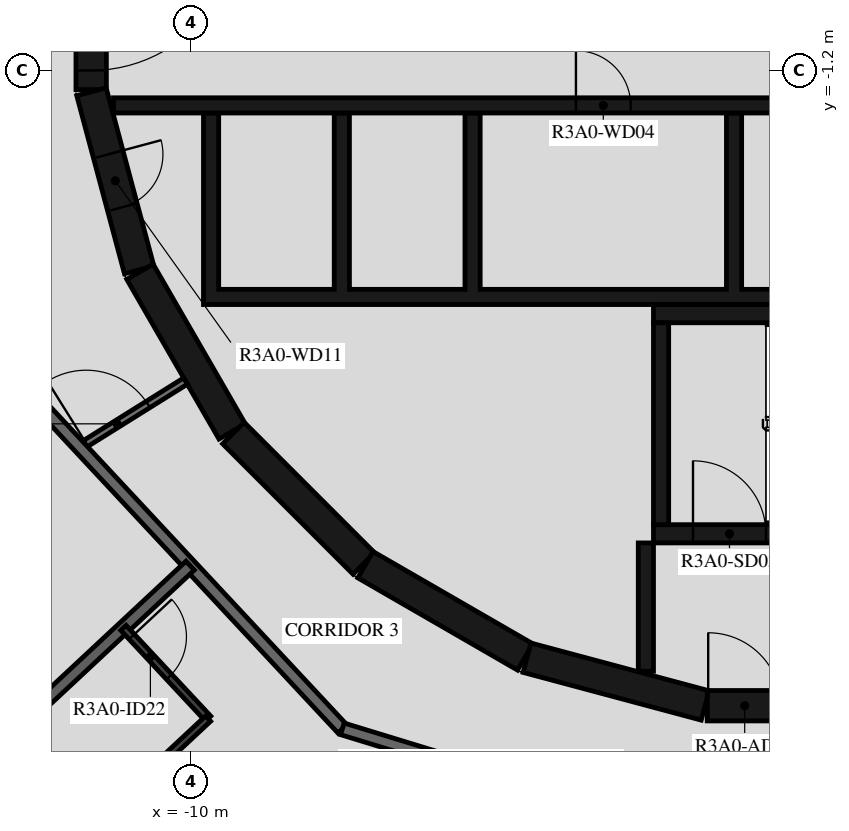
"""IFC4 building model, lengths in metres.
Left out: names, types, materials, properties, quantities, classifications, styles, units other than length and angle.
Written with IfcOpenShell. Run it as: python <this file> out.ifc"""

import sys

from ifc_helpers import new_model, si_unit, direction, frame, frame_2d, origin, place, context, subcontext, project, spatial, polyline, rectangle, outline, extrude, element, fill, save


model = new_model("IFC4")
c1 = context("Model", 3, precision=1e-05, world=origin(), true_north=direction((0.0, 1.0)))
c2 = subcontext(c1, "Body", "Model", "MODEL_VIEW")
j1 = project(units=[si_unit("LENGTHUNIT", "METRE"), si_unit("PLANEANGLEUNIT", "RADIAN")], contexts=[c1])
p1 = place(None, origin())
s1 = spatial("IfcSite", under=j1, at=p1, CompositionType="ELEMENT")
p2 = place(p1, origin())
s2 = spatial("IfcBuilding", under=s1, at=p2, CompositionType="ELEMENT")
p3 = place(p2, frame((0.0, 0.0, 113.4)))
s3 = spatial("IfcBuildingStorey", under=s2, at=p3, CompositionType="ELEMENT", Elevation=113.4)
p4 = place(p3, frame((-11.647, 1.516, 0.0), z_axis=(0.0, 0.0, 1.0), x_axis=(0.0, -1.0, 0.0)))
e1 = element("IfcWall", 1, at=p4, inside=s3, PredefinedType="SHEAR", context=c2, shape_type="SweptSolid", body=[
    extrude(rectangle(XDim=3.033, YDim=0.5, at=frame_2d((1.516, 0.0))), origin(), (0.0, 0.0, 1.0), 3.12),
])
p5 = place(p4, frame((0.316, 0.0, 0.0)))
e2 = element("IfcOpeningElement", 2, at=p5, cuts=e1, PredefinedType="OPENING", context=c2, shape_type="SweptSolid", body=[
    extrude(rectangle(XDim=2.4, YDim=2.1, at=frame_2d((1.2, 1.05))), frame((0.0, 0.26, 0.0), z_axis=(0.0, -1.0, 0.0), x_axis=(1.0, 0.0, 0.0)), (0.0, 0.0, 1.0), 0.52),
])
p6 = place(p3, frame((-11.643, -1.55, 0.0), z_axis=(0.0, 0.0, 1.0), x_axis=(0.258734743916, -0.965948410781, 0.0)))
e3 = element("IfcWall", 3, at=p6, inside=s3, PredefinedType="SHEAR", context=c2, shape_type="SweptSolid", body=[
    extrude(rectangle(XDim=3.033, YDim=0.5, at=frame_2d((1.516, 0.0))), origin(), (0.0, 0.0, 1.0), 3.12),
])
p7 = place(p6, frame((1.066, 0.0, 0.0)))
e4 = element("IfcOpeningElement", 4, at=p7, cuts=e3, PredefinedType="OPENING", context=c2, shape_type="SweptSolid", body=[
    extrude(rectangle(XDim=0.9, YDim=2.1, at=frame_2d((0.45, 1.05))), frame((0.0, 0.26, 0.0), z_axis=(0.0, -1.0, 0.0), x_axis=(1.0, 0.0, 0.0)), (0.0, 0.0, 1.0), 0.52),
])
p8 = place(p3, frame((-10.845, -4.51, 0.0), z_axis=(0.0, 0.0, 1.0), x_axis=(0.500087131594, -0.865975092491, 0.0)))
e5 = element("IfcWall", 5, at=p8, inside=s3, PredefinedType="SHEAR", context=c2, shape_type="SweptSolid", body=[
    extrude(rectangle(XDim=3.033, YDim=0.5, at=frame_2d((1.516, 0.0))), origin(), (0.0, 0.0, 1.0), 3.12),
])
p9 = place(p3, frame((-9.308, -7.164, 0.0), z_axis=(0.0, 0.0, 1.0), x_axis=(0.707106781187, -0.707106781187, 0.0)))
e6 = element("IfcWall", 6, at=p9, inside=s3, PredefinedType="SHEAR", context=c2, shape_type="SweptSolid", body=[
    extrude(rectangle(XDim=3.032, YDim=0.5, at=frame_2d((1.516, 0.0))), origin(), (0.0, 0.0, 1.0), 3.12),
])
for number, where, z_axis, x_axis in (
    (7, (-7.137, -9.329, 0.0), (0.0, 0.0, 1.0), (0.866, -0.5, 0.0)),
    (8, (-4.479, -10.858, 0.0), (0.0, 0.0, 1.0), (0.966, -0.259, 0.0)),
):
    element("IfcWall", number, at=place(p3, frame(where, z_axis=z_axis, x_axis=x_axis)), inside=s3, PredefinedType="SHEAR", context=c2, shape_type="SweptSolid", body=[
        extrude(rectangle(XDim=3.033, YDim=0.5, at=frame_2d((1.516, 0.0))), origin(), (0.0, 0.0, 1.0), 3.12),
    ])
p10 = place(p3, frame((-1.516, -11.647, 0.0), z_axis=(0.0, 0.0, 1.0), x_axis=(1.0, 0.0, 0.0)))
e9 = element("IfcWall", 9, at=p10, inside=s3, PredefinedType="SHEAR", context=c2, shape_type="SweptSolid", body=[
    extrude(rectangle(XDim=3.033, YDim=0.5, at=frame_2d((1.516, 0.0))), origin(), (0.0, 0.0, 1.0), 3.12),
])
p11 = place(p10, frame((0.016, 0.0, 0.0)))
e10 = element("IfcOpeningElement", 10, at=p11, cuts=e9, PredefinedType="OPENING", context=c2, shape_type="SweptSolid", body=[
    extrude(rectangle(XDim=1.2, YDim=2.1, at=frame_2d((0.6, 1.05))), frame((0.0, 0.26, 0.0), z_axis=(0.0, -1.0, 0.0), x_axis=(1.0, 0.0, 0.0)), (0.0, 0.0, 1.0), 0.52),
])
p12 = place(p3, frame((-2.275, -8.67, 0.0), z_axis=(0.0, 0.0, 1.0), x_axis=(0.0, 1.0, 0.0)))
e11 = element("IfcWall", 11, at=p12, inside=s3, PredefinedType="SHEAR", context=c2, shape_type="SweptSolid", body=[
    extrude(rectangle(XDim=3.32, YDim=0.25, at=frame_2d((1.66, 0.0))), origin(), (0.0, 0.0, 1.0), 3.12),
])
p13 = place(p3, frame((-2.4, -5.2, 0.0), z_axis=(0.0, 0.0, 1.0), x_axis=(1.0, 0.0, 0.0)))
e12 = element("IfcWall", 12, at=p13, inside=s3, PredefinedType="SHEAR", context=c2, shape_type="SweptSolid", body=[
    extrude(rectangle(XDim=7.05, YDim=0.3, at=frame_2d((3.525, 0.0))), origin(), (0.0, 0.0, 1.0), 3.12),
])
p14 = place(p3, frame((-2.4, -8.82, 0.0), z_axis=(0.0, 0.0, 1.0), x_axis=(1.0, 0.0, 0.0)))
e13 = element("IfcWall", 13, at=p14, inside=s3, PredefinedType="SHEAR", context=c2, shape_type="SweptSolid", body=[
    extrude(rectangle(XDim=2.5, YDim=0.3, at=frame_2d((1.25, 0.0))), origin(), (0.0, 0.0, 1.0), 3.12),
])
p15 = place(p14, frame((0.65, 0.0, 0.0)))
e14 = element("IfcOpeningElement", 14, at=p15, cuts=e13, PredefinedType="OPENING", context=c2, shape_type="SweptSolid", body=[
    extrude(rectangle(XDim=1.2, YDim=2.1, at=frame_2d((0.6, 1.05))), frame((0.0, 0.16, 0.0), z_axis=(0.0, -1.0, 0.0), x_axis=(1.0, 0.0, 0.0)), (0.0, 0.0, 1.0), 0.32),
])
p16 = place(p3, frame((-2.525, -8.97, 0.0), z_axis=(0.0, 0.0, 1.0), x_axis=(0.0, -1.0, 0.0)))
e15 = element("IfcWall", 15, at=p16, inside=s3, PredefinedType="SHEAR", context=c2, shape_type="SweptSolid", body=[
    extrude(rectangle(XDim=2.11, YDim=0.25, at=frame_2d((1.055, 0.0))), origin(), (0.0, 0.0, 1.0), 3.12),
])
p17 = place(p3, origin())
e16 = element("IfcWall", 16, at=p17, inside=s3, PredefinedType="SHEAR", context=c2, shape_type="SweptSolid", body=[
    extrude(outline(polyline([(9.8, -5.05), (9.8, -4.8), (9.8, -1.9), (9.55, -1.9), (9.55, -4.8), (7.65, -4.8), (7.65, -1.9), (7.4, -1.9), (7.4, -4.8), (5.5, -4.8), (5.5, -1.9), (5.25, -1.9), (5.25, -4.8), (3.35, -4.8), (3.35, -1.9), (3.1, -1.9), (3.1, -4.8), (1.2, -4.8), (1.2, -1.9), (0.95, -1.9), (0.95, -4.8), (-0.95, -4.8), (-0.95, -1.9), (-1.2, -1.9), (-1.2, -4.8), (-5.25, -4.8), (-5.25, -1.9), (-5.5, -1.9), (-5.5, -4.8), (-7.4, -4.8), (-7.4, -1.9), (-7.65, -1.9), (-7.65, -4.8), (-9.55, -4.8), (-9.55, -1.9), (-9.8, -1.9), (-9.8, -4.8), (-9.8, -5.05), (9.8, -5.05)])), origin(), (0.0, 0.0, 1.0), 3.12),
])
p18 = place(p3, frame((-11.28, -1.775, 0.0), z_axis=(0.0, 0.0, 1.0), x_axis=(1.0, 0.0, 0.0)))
e17 = element("IfcWall", 17, at=p18, inside=s3, PredefinedType="SHEAR", context=c2, shape_type="SweptSolid", body=[
    extrude(rectangle(XDim=14.38, YDim=0.25, at=frame_2d((7.19, 0.0))), origin(), (0.0, 0.0, 1.0), 3.12),
])
p19 = place(p18, frame((7.605, 0.0, 0.0)))
e18 = element("IfcOpeningElement", 18, at=p19, cuts=e17, PredefinedType="OPENING", context=c2, shape_type="SweptSolid", body=[
    extrude(rectangle(XDim=0.9, YDim=2.1, at=frame_2d((0.45, 1.05))), frame((0.0, 0.135, 0.0), z_axis=(0.0, -1.0, 0.0), x_axis=(1.0, 0.0, 0.0)), (0.0, 0.0, 1.0), 0.27),
])
p20 = place(p18, frame((10.83, 0.0, 0.0)))
e19 = element("IfcOpeningElement", 19, at=p20, cuts=e17, PredefinedType="OPENING", context=c2, shape_type="SweptSolid", body=[
    extrude(rectangle(XDim=0.9, YDim=2.1, at=frame_2d((0.45, 1.05))), frame((0.0, 0.135, 0.0), z_axis=(0.0, -1.0, 0.0), x_axis=(1.0, 0.0, 0.0)), (0.0, 0.0, 1.0), 0.27),
])
p21 = place(p18, frame((12.98, 0.0, 0.0)))
e20 = element("IfcOpeningElement", 20, at=p21, cuts=e17, PredefinedType="OPENING", context=c2, shape_type="SweptSolid", body=[
    extrude(rectangle(XDim=0.9, YDim=2.1, at=frame_2d((0.45, 1.05))), frame((0.0, 0.135, 0.0), z_axis=(0.0, -1.0, 0.0), x_axis=(1.0, 0.0, 0.0)), (0.0, 0.0, 1.0), 0.27),
])
p22 = place(p3, frame((-11.836, -7.396, 0.0), z_axis=(0.0, 0.0, 1.0), x_axis=(0.848071831599, 0.529881277692, 0.0)))
e21 = element("IfcWall", 21, at=p22, inside=s3, PredefinedType="PARTITIONING", context=c2, shape_type="SweptSolid", body=[
    extrude(rectangle(XDim=2.052, YDim=0.12, at=frame_2d((1.026, 0.0))), origin(), (0.0, 0.0, 1.0), 3.12),
])
p23 = place(p22, frame((0.125, 0.0, 0.0)))
e22 = element("IfcOpeningElement", 22, at=p23, cuts=e21, PredefinedType="OPENING", context=c2, shape_type="SweptSolid", body=[
    extrude(rectangle(XDim=1.2, YDim=2.1, at=frame_2d((0.6, 1.05))), frame((0.0, 0.07, 0.0), z_axis=(0.0, -1.0, 0.0), x_axis=(1.0, 0.0, 0.0)), (0.0, 0.0, 1.0), 0.14),
])
p24 = place(p3, frame((-12.523, -6.659, 0.0), z_axis=(0.0, 0.0, 1.0), x_axis=(0.682001841105, -0.731350455479, 0.0)))
e23 = element("IfcWall", 23, at=p24, inside=s3, PredefinedType="STANDARD", context=c2, shape_type="SweptSolid", body=[
    extrude(rectangle(XDim=7.342, YDim=0.2, at=frame_2d((3.671, 0.0))), origin(), (0.0, 0.0, 1.0), 3.12),
])
p25 = place(p3, frame((-7.516, -12.028, 0.0), z_axis=(0.0, 0.0, 1.0), x_axis=(0.956306642771, -0.292365533182, 0.0)))
e24 = element("IfcWall", 24, at=p25, inside=s3, PredefinedType="STANDARD", context=c2, shape_type="SweptSolid", body=[
    extrude(rectangle(XDim=7.342, YDim=0.2, at=frame_2d((3.671, 0.0))), origin(), (0.0, 0.0, 1.0), 3.12),
])
p26 = place(p25, frame((5.745, 0.0, 0.0)))
e25 = element("IfcOpeningElement", 25, at=p26, cuts=e24, PredefinedType="OPENING", context=c2, shape_type="SweptSolid", body=[
    extrude(rectangle(XDim=1.0, YDim=2.1, at=frame_2d((0.5, 1.05))), frame((0.0, 0.11, 0.0), z_axis=(0.0, -1.0, 0.0), x_axis=(1.0, 0.0, 0.0)), (0.0, 0.0, 1.0), 0.22),
])
p27 = place(p3, frame((-13.699, -12.774, 0.0), z_axis=(0.0, 0.0, 1.0), x_axis=(0.731353758457, 0.681998299111, 0.0)))
e26 = element("IfcWall", 26, at=p27, inside=s3, PredefinedType="STANDARD", context=c2, shape_type="SweptSolid", body=[
    extrude(rectangle(XDim=5.031, YDim=0.2, at=frame_2d((2.515, 0.0))), origin(), (0.0, 0.0, 1.0), 3.12),
])
p28 = place(p3, frame((-11.117, -10.366, 0.0), z_axis=(0.0, 0.0, 1.0), x_axis=(0.682041233274, -0.731313719353, 0.0)))
e27 = element("IfcWall", 27, at=p28, inside=s3, PredefinedType="PARTITIONING", context=c2, shape_type="SweptSolid", body=[
    extrude(rectangle(XDim=2.042, YDim=0.12, at=frame_2d((1.021, 0.0))), origin(), (0.0, 0.0, 1.0), 3.12),
])
p29 = place(p28, frame((0.2, 0.0, 0.0)))
e28 = element("IfcOpeningElement", 28, at=p29, cuts=e27, PredefinedType="OPENING", context=c2, shape_type="SweptSolid", body=[
    extrude(rectangle(XDim=0.9, YDim=2.1, at=frame_2d((0.45, 1.05))), frame((0.0, 0.07, 0.0), z_axis=(0.0, -1.0, 0.0), x_axis=(1.0, 0.0, 0.0)), (0.0, 0.0, 1.0), 0.14),
])
p30 = place(p3, frame((-9.724, -11.859, 0.0), z_axis=(0.0, 0.0, 1.0), x_axis=(-0.731365154613, -0.681986078023, 0.0)))
e29 = element("IfcWall", 29, at=p30, inside=s3, PredefinedType="PARTITIONING", context=c2, shape_type="SweptSolid", body=[
    extrude(rectangle(XDim=4.4, YDim=0.12, at=frame_2d((2.2, 0.0))), origin(), (0.0, 0.0, 1.0), 3.12),
])
p31 = place(p15, origin())
e30 = element("IfcDoor", 30, at=p31, inside=s3, OperationType="SINGLE_SWING_LEFT", PredefinedType="DOOR", context=c2, shape_type="SweptSolid", body=[
    extrude(rectangle(XDim=1.2, YDim=2.1, at=frame_2d((0.6, 1.05))), frame((0.0, 0.025, 0.0), z_axis=(0.0, -1.0, 0.0), x_axis=(1.0, 0.0, 0.0)), (0.0, 0.0, 1.0), 0.05),
])
fill(e14, e30)
p32 = place(p11, origin())
e31 = element("IfcDoor", 31, at=p32, inside=s3, OperationType="SINGLE_SWING_RIGHT", PredefinedType="DOOR", context=c2, shape_type="SweptSolid", body=[
    extrude(rectangle(XDim=1.2, YDim=2.1, at=frame_2d((0.6, 1.05))), frame((0.0, 0.025, 0.0), z_axis=(0.0, -1.0, 0.0), x_axis=(1.0, 0.0, 0.0)), (0.0, 0.0, 1.0), 0.05),
])
fill(e10, e31)
p33 = place(p5, origin())
e32 = element("IfcDoor", 32, at=p33, inside=s3, OperationType="DOUBLE_DOOR_SINGLE_SWING", PredefinedType="DOOR", context=c2, shape_type="SweptSolid", body=[
    extrude(rectangle(XDim=2.4, YDim=2.1, at=frame_2d((1.2, 1.05))), frame((0.0, 0.025, 0.0), z_axis=(0.0, -1.0, 0.0), x_axis=(1.0, 0.0, 0.0)), (0.0, 0.0, 1.0), 0.05),
])
fill(e2, e32)
p34 = place(p19, origin())
e33 = element("IfcDoor", 33, at=p34, inside=s3, OperationType="SINGLE_SWING_LEFT", PredefinedType="DOOR", context=c2, shape_type="SweptSolid", body=[
    extrude(rectangle(XDim=0.9, YDim=2.1, at=frame_2d((0.45, 1.05))), frame((0.0, 0.025, 0.0), z_axis=(0.0, -1.0, 0.0), x_axis=(1.0, 0.0, 0.0)), (0.0, 0.0, 1.0), 0.05),
])
fill(e18, e33)
p35 = place(p7, origin())
e34 = element("IfcDoor", 34, at=p35, inside=s3, OperationType="SINGLE_SWING_RIGHT", PredefinedType="DOOR", context=c2, shape_type="SweptSolid", body=[
    extrude(rectangle(XDim=0.9, YDim=2.1, at=frame_2d((0.45, 1.05))), frame((0.0, 0.025, 0.0), z_axis=(0.0, -1.0, 0.0), x_axis=(1.0, 0.0, 0.0)), (0.0, 0.0, 1.0), 0.05),
])
fill(e4, e34)
p36 = place(p29, origin())
e35 = element("IfcDoor", 35, at=p36, inside=s3, OperationType="SINGLE_SWING_LEFT", PredefinedType="DOOR", context=c2, shape_type="SweptSolid", body=[
    extrude(rectangle(XDim=0.9, YDim=2.1, at=frame_2d((0.45, 1.05))), frame((0.0, 0.025, 0.0), z_axis=(0.0, -1.0, 0.0), x_axis=(1.0, 0.0, 0.0)), (0.0, 0.0, 1.0), 0.05),
])
fill(e28, e35)
p37 = place(p23, origin())
e36 = element("IfcDoor", 36, at=p37, inside=s3, OperationType="DOUBLE_DOOR_SINGLE_SWING", PredefinedType="DOOR", context=c2, shape_type="SweptSolid", body=[
    extrude(rectangle(XDim=1.2, YDim=2.1, at=frame_2d((0.6, 1.05))), frame((0.0, 0.025, 0.0), z_axis=(0.0, -1.0, 0.0), x_axis=(1.0, 0.0, 0.0)), (0.0, 0.0, 1.0), 0.05),
])
fill(e22, e36)
save(model, sys.argv[1])
